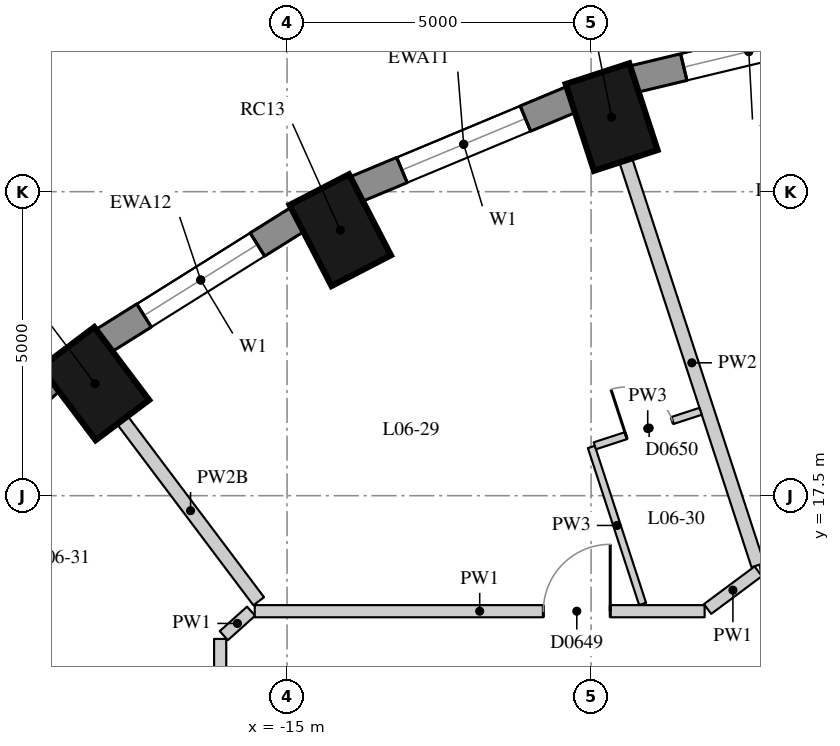
"""IFC4 building model, lengths in metres.
Left out: names, types, materials, properties, quantities, classifications, styles, units other than length and angle.
Written with IfcOpenShell. Run it as: python <this file> out.ifc"""

import sys

from ifc_helpers import new_model, si_unit, direction, frame, frame_2d, origin, origin_2d, place, context, subcontext, project, spatial, rectangle, extrude, element, fill, save


model = new_model("IFC4")
c1 = context("Model", 3, precision=1e-05, world=origin(), true_north=direction((0.0, 1.0)))
c2 = subcontext(c1, "Body", "Model", "MODEL_VIEW")
j1 = project(units=[si_unit("LENGTHUNIT", "METRE"), si_unit("PLANEANGLEUNIT", "RADIAN")], contexts=[c1])
p1 = place(None, origin())
s1 = spatial("IfcSite", under=j1, at=p1, CompositionType="ELEMENT")
p2 = place(p1, origin())
s2 = spatial("IfcBuilding", under=s1, at=p2, CompositionType="ELEMENT")
p3 = place(p2, frame((0.0, 0.0, 28.3)))
s3 = spatial("IfcBuildingStorey", under=s2, at=p3, CompositionType="ELEMENT", Elevation=28.3)
for number, where, z_axis, x_axis in (
    (1, (-9.662, 23.727, 0.0), (0.0, 0.0, 1.0), (-0.31, 0.951, 0.0)),
    (2, (-14.125, 21.867, 0.0), (0.0, 0.0, 1.0), (-0.46, 0.888, 0.0)),
    (3, (-18.159, 19.343, 0.0), (0.0, 0.0, 1.0), (-0.601, 0.799, 0.0)),
):
    element("IfcColumn", number, at=place(p3, frame(where, z_axis=z_axis, x_axis=x_axis)), inside=s3, PredefinedType="COLUMN", context=c2, shape_type="SweptSolid", body=[
        extrude(rectangle(XDim=1.5, YDim=1.1, at=origin_2d()), origin(), (0.0, 0.0, 1.0), 3.3),
    ])
p4 = place(p3, frame((-5.504, 25.26, 0.0), z_axis=(0.0, 0.0, 1.0), x_axis=(-0.972496561493, -0.232917233979, 0.0)))
e4 = element("IfcWall", 4, at=p4, inside=s3, PredefinedType="SOLIDWALL", context=c2, shape_type="SweptSolid", body=[
    extrude(rectangle(XDim=3.911, YDim=0.45, at=frame_2d((1.956, 0.0))), origin(), (0.0, 0.0, 1.0), 3.02),
])
p5 = place(p4, frame((0.855, 0.0, 0.4)))
e5 = element("IfcOpeningElement", 5, at=p5, cuts=e4, PredefinedType="OPENING", context=c2, shape_type="SweptSolid", body=[
    extrude(rectangle(XDim=2.2, YDim=1.75, at=frame_2d((1.1, 0.875))), frame((0.0, 0.235, 0.0), z_axis=(0.0, -1.0, 0.0), x_axis=(1.0, 0.0, 0.0)), (0.0, 0.0, 1.0), 0.47),
])
p6 = place(p3, frame((-10.315, 24.021, 0.0), z_axis=(0.0, 0.0, 1.0), x_axis=(-0.923031964282, -0.384723267966, 0.0)))
e6 = element("IfcWall", 6, at=p6, inside=s3, PredefinedType="SOLIDWALL", context=c2, shape_type="SweptSolid", body=[
    extrude(rectangle(XDim=3.856, YDim=0.45, at=frame_2d((1.928, 0.0))), origin(), (0.0, 0.0, 1.0), 3.02),
])
p7 = place(p6, frame((0.828, 0.0, 0.4)))
e7 = element("IfcOpeningElement", 7, at=p7, cuts=e6, PredefinedType="OPENING", context=c2, shape_type="SweptSolid", body=[
    extrude(rectangle(XDim=2.2, YDim=1.75, at=frame_2d((1.1, 0.875))), frame((0.0, 0.235, 0.0), z_axis=(0.0, -1.0, 0.0), x_axis=(1.0, 0.0, 0.0)), (0.0, 0.0, 1.0), 0.47),
])
p8 = place(p3, frame((-14.817, 22.051, 0.0), z_axis=(0.0, 0.0, 1.0), x_axis=(-0.847635480093, -0.530579016629, 0.0)))
e8 = element("IfcWall", 8, at=p8, inside=s3, PredefinedType="SOLIDWALL", context=c2, shape_type="SweptSolid", body=[
    extrude(rectangle(XDim=3.782, YDim=0.45, at=frame_2d((1.891, 0.0))), origin(), (0.0, 0.0, 1.0), 3.02),
])
p9 = place(p8, frame((0.791, 0.0, 0.4)))
e9 = element("IfcOpeningElement", 9, at=p9, cuts=e8, PredefinedType="OPENING", context=c2, shape_type="SweptSolid", body=[
    extrude(rectangle(XDim=2.2, YDim=1.75, at=frame_2d((1.1, 0.875))), frame((0.0, 0.235, 0.0), z_axis=(0.0, -1.0, 0.0), x_axis=(1.0, 0.0, 0.0)), (0.0, 0.0, 1.0), 0.47),
])
p10 = place(p3, frame((-18.871, 19.407, 0.0), z_axis=(0.0, 0.0, 1.0), x_axis=(-0.745526233716, -0.66647628228, 0.0)))
e10 = element("IfcWall", 10, at=p10, inside=s3, PredefinedType="SOLIDWALL", context=c2, shape_type="SweptSolid", body=[
    extrude(rectangle(XDim=3.697, YDim=0.45, at=frame_2d((1.848, 0.0))), origin(), (0.0, 0.0, 1.0), 3.02),
])
p11 = place(p10, frame((0.749, 0.0, 0.4)))
e11 = element("IfcOpeningElement", 11, at=p11, cuts=e10, PredefinedType="OPENING", context=c2, shape_type="SweptSolid", body=[
    extrude(rectangle(XDim=2.2, YDim=1.75, at=frame_2d((1.1, 0.875))), frame((0.0, 0.235, 0.0), z_axis=(0.0, -1.0, 0.0), x_axis=(1.0, 0.0, 0.0)), (0.0, 0.0, 1.0), 0.47),
])
p12 = place(p3, frame((-16.1, 9.751, 0.0), z_axis=(0.0, 0.0, 1.0), x_axis=(0.0, 1.0, 0.0)))
e12 = element("IfcWall", 12, at=p12, inside=s3, PredefinedType="PARTITIONING", context=c2, shape_type="SweptSolid", body=[
    extrude(rectangle(XDim=5.393, YDim=0.2, at=frame_2d((2.696, 0.0))), origin(), (0.0, 0.0, 1.0), 3.02),
])
p13 = place(p12, frame((2.786, 0.0, 0.0)))
e13 = element("IfcOpeningElement", 13, at=p13, cuts=e12, PredefinedType="OPENING", context=c2, shape_type="SweptSolid", body=[
    extrude(rectangle(XDim=1.1, YDim=2.1, at=frame_2d((0.55, 1.05))), frame((0.0, 0.11, 0.0), z_axis=(0.0, -1.0, 0.0), x_axis=(1.0, 0.0, 0.0)), (0.0, 0.0, 1.0), 0.22),
])
p14 = place(p3, frame((-16.041, 15.198, 0.0), z_axis=(0.0, 0.0, 1.0), x_axis=(0.744722115519, 0.667374685359, 0.0)))
e14 = element("IfcWall", 14, at=p14, inside=s3, PredefinedType="PARTITIONING", context=c2, shape_type="SweptSolid", body=[
    extrude(rectangle(XDim=0.603, YDim=0.2, at=frame_2d((0.301, 0.0))), origin(), (0.0, 0.0, 1.0), 3.02),
])
p15 = place(p3, frame((-15.531, 15.6, 0.0), z_axis=(0.0, 0.0, 1.0), x_axis=(1.0, 0.0, 0.0)))
e15 = element("IfcWall", 15, at=p15, inside=s3, PredefinedType="PARTITIONING", context=c2, shape_type="SweptSolid", body=[
    extrude(rectangle(XDim=7.399, YDim=0.2, at=frame_2d((3.699, 0.0))), origin(), (0.0, 0.0, 1.0), 3.02),
])
p16 = place(p15, frame((4.747, 0.0, 0.0)))
e16 = element("IfcOpeningElement", 16, at=p16, cuts=e15, PredefinedType="OPENING", context=c2, shape_type="SweptSolid", body=[
    extrude(rectangle(XDim=1.1, YDim=2.1, at=frame_2d((0.55, 1.05))), frame((0.0, 0.11, 0.0), z_axis=(0.0, -1.0, 0.0), x_axis=(1.0, 0.0, 0.0)), (0.0, 0.0, 1.0), 0.22),
])
p17 = place(p3, frame((-8.084, 15.636, 0.0), z_axis=(0.0, 0.0, 1.0), x_axis=(0.802193962144, 0.597063520155, 0.0)))
e17 = element("IfcWall", 17, at=p17, inside=s3, PredefinedType="PARTITIONING", context=c2, shape_type="SweptSolid", body=[
    extrude(rectangle(XDim=1.039, YDim=0.2, at=frame_2d((0.52, 0.0))), origin(), (0.0, 0.0, 1.0), 3.02),
])
p18 = place(p3, frame((-7.211, 16.263, 0.0), z_axis=(0.0, 0.0, 1.0), x_axis=(0.987792503573, 0.155775382796, 0.0)))
e18 = element("IfcWall", 18, at=p18, inside=s3, PredefinedType="PARTITIONING", context=c2, shape_type="SweptSolid", body=[
    extrude(rectangle(XDim=7.3, YDim=0.2, at=frame_2d((3.65, 0.0))), origin(), (0.0, 0.0, 1.0), 3.02),
])
p19 = place(p18, frame((5.581, 0.0, 0.0)))
e19 = element("IfcOpeningElement", 19, at=p19, cuts=e18, PredefinedType="OPENING", context=c2, shape_type="SweptSolid", body=[
    extrude(rectangle(XDim=1.0, YDim=2.1, at=frame_2d((0.5, 1.05))), frame((0.0, 0.11, 0.0), z_axis=(0.0, -1.0, 0.0), x_axis=(1.0, 0.0, 0.0)), (0.0, 0.0, 1.0), 0.22),
])
p20 = place(p18, frame((0.68, 0.0, 0.0)))
e20 = element("IfcOpeningElement", 20, at=p20, cuts=e18, PredefinedType="OPENING", context=c2, shape_type="SweptSolid", body=[
    extrude(rectangle(XDim=1.0, YDim=2.1, at=frame_2d((0.5, 1.05))), frame((0.0, 0.11, 0.0), z_axis=(0.0, -1.0, 0.0), x_axis=(1.0, 0.0, 0.0)), (0.0, 0.0, 1.0), 0.22),
])
p21 = place(p3, frame((-9.429, 23.014, 0.0), z_axis=(0.0, 0.0, 1.0), x_axis=(0.310239117306, -0.950658555998, 0.0)))
e21 = element("IfcWall", 21, at=p21, inside=s3, PredefinedType="PARTITIONING", context=c2, shape_type="SweptSolid", body=[
    extrude(rectangle(XDim=7.003, YDim=0.22, at=frame_2d((3.501, 0.0))), origin(), (0.0, 0.0, 1.0), 3.02),
])
p22 = place(p3, frame((-17.708, 18.743, 0.0), z_axis=(0.0, 0.0, 1.0), x_axis=(0.601172757903, -0.799119086967, 0.0)))
e22 = element("IfcWall", 22, at=p22, inside=s3, PredefinedType="PARTITIONING", context=c2, shape_type="SweptSolid", body=[
    extrude(rectangle(XDim=3.729, YDim=0.22, at=frame_2d((1.864, 0.0))), origin(), (0.0, 0.0, 1.0), 2.57),
])
p23 = place(p3, frame((-21.093, 15.718, 0.0), z_axis=(0.0, 0.0, 1.0), x_axis=(0.73009284205, -0.683347965525, 0.0)))
e23 = element("IfcWall", 23, at=p23, inside=s3, PredefinedType="PARTITIONING", context=c2, shape_type="SweptSolid", body=[
    extrude(rectangle(XDim=6.602, YDim=0.22, at=frame_2d((3.301, 0.0))), origin(), (0.0, 0.0, 1.0), 3.02),
])
p24 = place(p3, frame((-9.153, 15.719, 0.0), z_axis=(0.0, 0.0, 1.0), x_axis=(-0.310236037509, 0.950659561058, 0.0)))
e24 = element("IfcWall", 24, at=p24, inside=s3, PredefinedType="PARTITIONING", context=c2, shape_type="SweptSolid", body=[
    extrude(rectangle(XDim=2.717, YDim=0.12, at=frame_2d((1.358, 0.0))), origin(), (0.0, 0.0, 1.0), 3.02),
])
p25 = place(p3, frame((-9.938, 18.32, 0.0), z_axis=(0.0, 0.0, 1.0), x_axis=(0.950678536911, 0.31017788357, 0.0)))
e25 = element("IfcWall", 25, at=p25, inside=s3, PredefinedType="PARTITIONING", context=c2, shape_type="SweptSolid", body=[
    extrude(rectangle(XDim=1.83, YDim=0.12, at=frame_2d((0.915, 0.0))), origin(), (0.0, 0.0, 1.0), 3.02),
])
p26 = place(p25, frame((0.54, 0.0, 0.0)))
e26 = element("IfcOpeningElement", 26, at=p26, cuts=e25, PredefinedType="OPENING", context=c2, shape_type="SweptSolid", body=[
    extrude(rectangle(XDim=0.8, YDim=2.1, at=frame_2d((0.4, 1.05))), frame((0.0, 0.07, 0.0), z_axis=(0.0, -1.0, 0.0), x_axis=(1.0, 0.0, 0.0)), (0.0, 0.0, 1.0), 0.14),
])
p27 = place(p5, origin())
e27 = element("IfcWindow", 27, at=p27, inside=s3, PartitioningType="SINGLE_PANEL", PredefinedType="WINDOW", context=c2, shape_type="SweptSolid", body=[
    extrude(rectangle(XDim=2.2, YDim=1.75, at=frame_2d((1.1, 0.875))), frame((0.0, 0.035, 0.0), z_axis=(0.0, -1.0, 0.0), x_axis=(1.0, 0.0, 0.0)), (0.0, 0.0, 1.0), 0.06),
])
fill(e5, e27)
p28 = place(p7, origin())
e28 = element("IfcWindow", 28, at=p28, inside=s3, PartitioningType="SINGLE_PANEL", PredefinedType="WINDOW", context=c2, shape_type="SweptSolid", body=[
    extrude(rectangle(XDim=2.2, YDim=1.75, at=frame_2d((1.1, 0.875))), frame((0.0, 0.035, 0.0), z_axis=(0.0, -1.0, 0.0), x_axis=(1.0, 0.0, 0.0)), (0.0, 0.0, 1.0), 0.06),
])
fill(e7, e28)
p29 = place(p9, origin())
e29 = element("IfcWindow", 29, at=p29, inside=s3, PartitioningType="SINGLE_PANEL", PredefinedType="WINDOW", context=c2, shape_type="SweptSolid", body=[
    extrude(rectangle(XDim=2.2, YDim=1.75, at=frame_2d((1.1, 0.875))), frame((0.0, 0.035, 0.0), z_axis=(0.0, -1.0, 0.0), x_axis=(1.0, 0.0, 0.0)), (0.0, 0.0, 1.0), 0.06),
])
fill(e9, e29)
p30 = place(p16, origin())
e30 = element("IfcDoor", 30, at=p30, inside=s3, OperationType="SINGLE_SWING_RIGHT", PredefinedType="DOOR", context=c2, shape_type="SweptSolid", body=[
    extrude(rectangle(XDim=1.1, YDim=2.1, at=frame_2d((0.55, 1.05))), frame((0.0, 0.025, 0.0), z_axis=(0.0, -1.0, 0.0), x_axis=(1.0, 0.0, 0.0)), (0.0, 0.0, 1.0), 0.05),
])
fill(e16, e30)
p31 = place(p26, origin())
e31 = element("IfcDoor", 31, at=p31, inside=s3, OperationType="SINGLE_SWING_LEFT", PredefinedType="DOOR", context=c2, shape_type="SweptSolid", body=[
    extrude(rectangle(XDim=0.8, YDim=2.1, at=frame_2d((0.4, 1.05))), frame((0.0, 0.025, 0.0), z_axis=(0.0, -1.0, 0.0), x_axis=(1.0, 0.0, 0.0)), (0.0, 0.0, 1.0), 0.05),
])
fill(e26, e31)
save(model, sys.argv[1])
